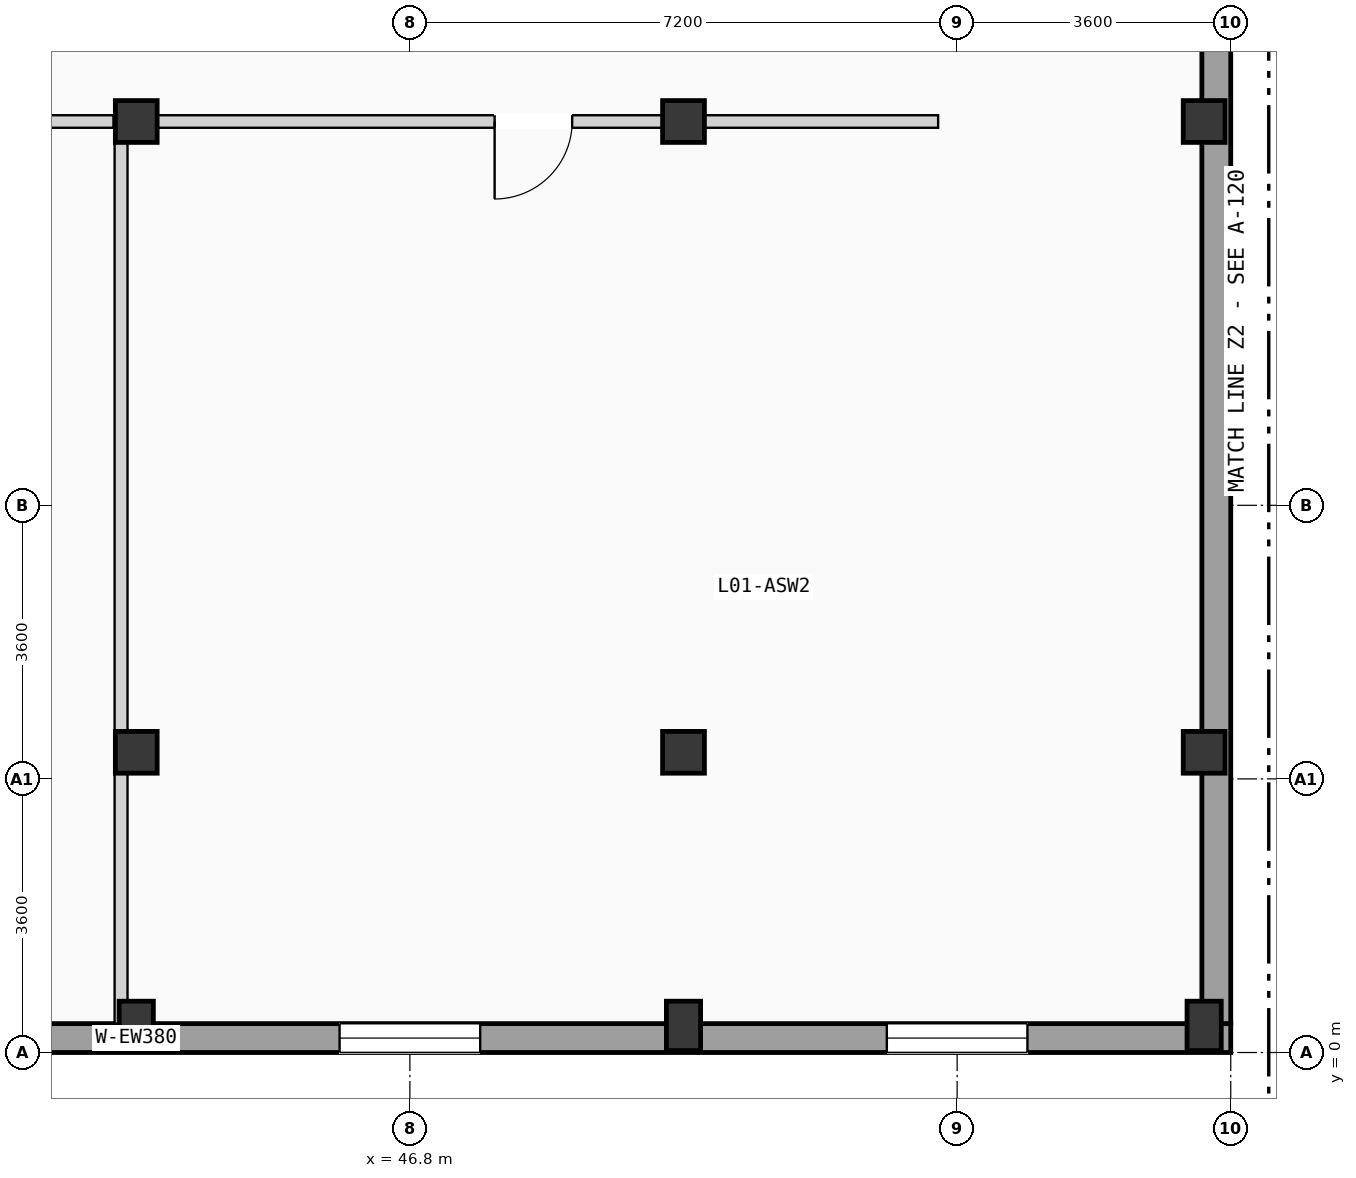
"""IFC4 building model, lengths in metres.
Left out: names, types, materials, properties, quantities, classifications, styles, units other than length and angle.
Written with IfcOpenShell. Run it as: python <this file> out.ifc"""

import sys

from ifc_helpers import new_model, si_unit, direction, frame, frame_2d, origin, origin_2d, place, context, subcontext, project, spatial, rectangle, extrude, element, fill, save


model = new_model("IFC4")
c1 = context("Model", 3, precision=1e-05, world=origin(), true_north=direction((0.0, 1.0)))
c2 = subcontext(c1, "Body", "Model", "MODEL_VIEW")
j1 = project(units=[si_unit("LENGTHUNIT", "METRE"), si_unit("PLANEANGLEUNIT", "RADIAN")], contexts=[c1])
p1 = place(None, origin())
s1 = spatial("IfcSite", under=j1, at=p1, CompositionType="ELEMENT")
p2 = place(p1, origin())
s2 = spatial("IfcBuilding", under=s1, at=p2, CompositionType="ELEMENT")
p3 = place(p2, frame((0.0, 0.0, 4.9)))
s3 = spatial("IfcBuildingStorey", under=s2, at=p3, CompositionType="ELEMENT", Elevation=4.9)
p4 = place(p3, frame((43.2, 0.35, 0.0), z_axis=(0.0, 0.0, 1.0), x_axis=(1.0, 0.0, 0.0)))
e1 = element("IfcColumn", 1, at=p4, inside=s3, PredefinedType="PILASTER", context=c2, shape_type="SweptSolid", body=[
    extrude(rectangle(XDim=0.45, YDim=0.65, at=origin_2d()), origin(), (0.0, 0.0, 1.0), 3.675),
])
for number, where, z_axis, x_axis in (
    (2, (43.2, 3.95, 0.0), (0.0, 0.0, 1.0), (1.0, 0.0, 0.0)),
    (3, (43.2, 12.25, 0.0), (0.0, 0.0, 1.0), (1.0, 0.0, 0.0)),
):
    element("IfcColumn", number, at=place(p3, frame(where, z_axis=z_axis, x_axis=x_axis)), inside=s3, PredefinedType="COLUMN", context=c2, shape_type="SweptSolid", body=[
        extrude(rectangle(XDim=0.55, YDim=0.55, at=origin_2d()), origin(), (0.0, 0.0, 1.0), 3.675),
    ])
p5 = place(p3, frame((50.4, 0.35, 0.0), z_axis=(0.0, 0.0, 1.0), x_axis=(1.0, 0.0, 0.0)))
e4 = element("IfcColumn", 4, at=p5, inside=s3, PredefinedType="PILASTER", context=c2, shape_type="SweptSolid", body=[
    extrude(rectangle(XDim=0.45, YDim=0.65, at=origin_2d()), origin(), (0.0, 0.0, 1.0), 3.675),
])
for number, where, z_axis, x_axis in (
    (5, (50.4, 3.95, 0.0), (0.0, 0.0, 1.0), (1.0, 0.0, 0.0)),
    (6, (50.4, 12.25, 0.0), (0.0, 0.0, 1.0), (1.0, 0.0, 0.0)),
):
    element("IfcColumn", number, at=place(p3, frame(where, z_axis=z_axis, x_axis=x_axis)), inside=s3, PredefinedType="COLUMN", context=c2, shape_type="SweptSolid", body=[
        extrude(rectangle(XDim=0.55, YDim=0.55, at=origin_2d()), origin(), (0.0, 0.0, 1.0), 3.675),
    ])
p6 = place(p3, frame((57.25, 0.35, 0.0), z_axis=(0.0, 0.0, 1.0), x_axis=(1.0, 0.0, 0.0)))
e7 = element("IfcColumn", 7, at=p6, inside=s3, PredefinedType="PILASTER", context=c2, shape_type="SweptSolid", body=[
    extrude(rectangle(XDim=0.45, YDim=0.65, at=origin_2d()), origin(), (0.0, 0.0, 1.0), 3.675),
])
for number, where, z_axis, x_axis in (
    (8, (57.25, 3.95, 0.0), (0.0, 0.0, 1.0), (1.0, 0.0, 0.0)),
    (9, (57.25, 12.25, 0.0), (0.0, 0.0, 1.0), (1.0, 0.0, 0.0)),
):
    element("IfcColumn", number, at=place(p3, frame(where, z_axis=z_axis, x_axis=x_axis)), inside=s3, PredefinedType="COLUMN", context=c2, shape_type="SweptSolid", body=[
        extrude(rectangle(XDim=0.55, YDim=0.55, at=origin_2d()), origin(), (0.0, 0.0, 1.0), 3.675),
    ])
p7 = place(p3, frame((28.8, 0.19, 0.0), z_axis=(0.0, 0.0, 1.0), x_axis=(1.0, 0.0, 0.0)))
e10 = element("IfcWall", 10, at=p7, inside=s3, PredefinedType="SOLIDWALL", context=c2, shape_type="SweptSolid", body=[
    extrude(rectangle(XDim=28.8, YDim=0.38, at=frame_2d((14.4, 0.0))), origin(), (0.0, 0.0, 1.0), 3.4),
])
p8 = place(p7, frame((2.675, 0.0, 0.85)))
e11 = element("IfcOpeningElement", 11, at=p8, cuts=e10, PredefinedType="OPENING", context=c2, shape_type="SweptSolid", body=[
    extrude(rectangle(XDim=1.85, YDim=1.2, at=frame_2d((0.925, 0.6))), frame((0.0, 0.2, 0.0), z_axis=(0.0, -1.0, 0.0), x_axis=(1.0, 0.0, 0.0)), (0.0, 0.0, 1.0), 0.4),
])
p9 = place(p7, frame((9.875, 0.0, 0.85)))
e12 = element("IfcOpeningElement", 12, at=p9, cuts=e10, PredefinedType="OPENING", context=c2, shape_type="SweptSolid", body=[
    extrude(rectangle(XDim=1.85, YDim=1.35, at=frame_2d((0.925, 0.675))), frame((0.0, 0.2, 0.0), z_axis=(0.0, -1.0, 0.0), x_axis=(1.0, 0.0, 0.0)), (0.0, 0.0, 1.0), 0.4),
])
p10 = place(p7, frame((17.075, 0.0, 0.85)))
e13 = element("IfcOpeningElement", 13, at=p10, cuts=e10, PredefinedType="OPENING", context=c2, shape_type="SweptSolid", body=[
    extrude(rectangle(XDim=1.85, YDim=1.5, at=frame_2d((0.925, 0.75))), frame((0.0, 0.2, 0.0), z_axis=(0.0, -1.0, 0.0), x_axis=(1.0, 0.0, 0.0)), (0.0, 0.0, 1.0), 0.4),
])
p11 = place(p7, frame((24.275, 0.0, 0.85)))
e14 = element("IfcOpeningElement", 14, at=p11, cuts=e10, PredefinedType="OPENING", context=c2, shape_type="SweptSolid", body=[
    extrude(rectangle(XDim=1.85, YDim=1.35, at=frame_2d((0.925, 0.675))), frame((0.0, 0.2, 0.0), z_axis=(0.0, -1.0, 0.0), x_axis=(1.0, 0.0, 0.0)), (0.0, 0.0, 1.0), 0.4),
])
p12 = place(p3, frame((57.41, 0.38, 0.0), z_axis=(0.0, 0.0, 1.0), x_axis=(0.0, 1.0, 0.0)))
e15 = element("IfcWall", 15, at=p12, inside=s3, PredefinedType="SOLIDWALL", context=c2, shape_type="SweptSolid", body=[
    extrude(rectangle(XDim=20.84, YDim=0.38, at=frame_2d((10.42, 0.0))), origin(), (0.0, 0.0, 1.0), 3.4),
])
p13 = place(p3, frame((32.65, 12.25, 0.0), z_axis=(0.0, 0.0, 1.0), x_axis=(1.0, 0.0, 0.0)))
e16 = element("IfcWall", 16, at=p13, inside=s3, PredefinedType="PARTITIONING", context=c2, shape_type="SweptSolid", body=[
    extrude(rectangle(XDim=10.25, YDim=0.165, at=frame_2d((5.125, 0.0))), origin(), (0.0, 0.0, 1.0), 2.72),
])
p14 = place(p13, frame((4.615, 0.0, 0.0)))
e17 = element("IfcOpeningElement", 17, at=p14, cuts=e16, PredefinedType="OPENING", context=c2, shape_type="SweptSolid", body=[
    extrude(rectangle(XDim=1.02, YDim=2.16, at=frame_2d((0.51, 1.08))), frame((0.0, 0.093, 0.0), z_axis=(0.0, -1.0, 0.0), x_axis=(1.0, 0.0, 0.0)), (0.0, 0.0, 1.0), 0.185),
])
p15 = place(p3, frame((43.1, 12.25, 0.0), z_axis=(0.0, 0.0, 1.0), x_axis=(1.0, 0.0, 0.0)))
e18 = element("IfcWall", 18, at=p15, inside=s3, PredefinedType="PARTITIONING", context=c2, shape_type="SweptSolid", body=[
    extrude(rectangle(XDim=10.65, YDim=0.165, at=frame_2d((5.325, 0.0))), origin(), (0.0, 0.0, 1.0), 2.72),
])
p16 = place(p15, frame((4.815, 0.0, 0.0)))
e19 = element("IfcOpeningElement", 19, at=p16, cuts=e18, PredefinedType="OPENING", context=c2, shape_type="SweptSolid", body=[
    extrude(rectangle(XDim=1.02, YDim=2.16, at=frame_2d((0.51, 1.08))), frame((0.0, 0.093, 0.0), z_axis=(0.0, -1.0, 0.0), x_axis=(1.0, 0.0, 0.0)), (0.0, 0.0, 1.0), 0.185),
])
p17 = place(p3, frame((43.0, 0.38, 0.0), z_axis=(0.0, 0.0, 1.0), x_axis=(0.0, 1.0, 0.0)))
e20 = element("IfcWall", 20, at=p17, inside=s3, PredefinedType="PARTITIONING", context=c2, shape_type="SweptSolid", body=[
    extrude(rectangle(XDim=11.788, YDim=0.17, at=frame_2d((5.894, 0.0))), origin(), (0.0, 0.0, 1.0), 2.77),
])
p18 = place(p10, origin())
e21 = element("IfcWindow", 21, at=p18, inside=s3, PartitioningType="DOUBLE_PANEL_VERTICAL", PredefinedType="WINDOW", context=c2, shape_type="SweptSolid", body=[
    extrude(rectangle(XDim=1.85, YDim=1.5, at=frame_2d((0.925, 0.75))), frame((0.0, 0.03, 0.0), z_axis=(0.0, -1.0, 0.0), x_axis=(1.0, 0.0, 0.0)), (0.0, 0.0, 1.0), 0.06),
])
fill(e13, e21)
p19 = place(p11, origin())
e22 = element("IfcWindow", 22, at=p19, inside=s3, PartitioningType="DOUBLE_PANEL_VERTICAL", PredefinedType="WINDOW", context=c2, shape_type="SweptSolid", body=[
    extrude(rectangle(XDim=1.85, YDim=1.35, at=frame_2d((0.925, 0.675))), frame((0.0, 0.03, 0.0), z_axis=(0.0, -1.0, 0.0), x_axis=(1.0, 0.0, 0.0)), (0.0, 0.0, 1.0), 0.06),
])
fill(e14, e22)
p20 = place(p16, frame((1.02, 0.0, 0.0), z_axis=(0.0, 0.0, 1.0), x_axis=(-1.0, 0.0, 0.0)))
e23 = element("IfcDoor", 23, at=p20, inside=s3, OperationType="SINGLE_SWING_LEFT", PredefinedType="DOOR", context=c2, shape_type="SweptSolid", body=[
    extrude(rectangle(XDim=1.02, YDim=2.16, at=frame_2d((0.51, 1.08))), frame((0.0, 0.025, 0.0), z_axis=(0.0, -1.0, 0.0), x_axis=(1.0, 0.0, 0.0)), (0.0, 0.0, 1.0), 0.05),
])
fill(e19, e23)
save(model, sys.argv[1])
